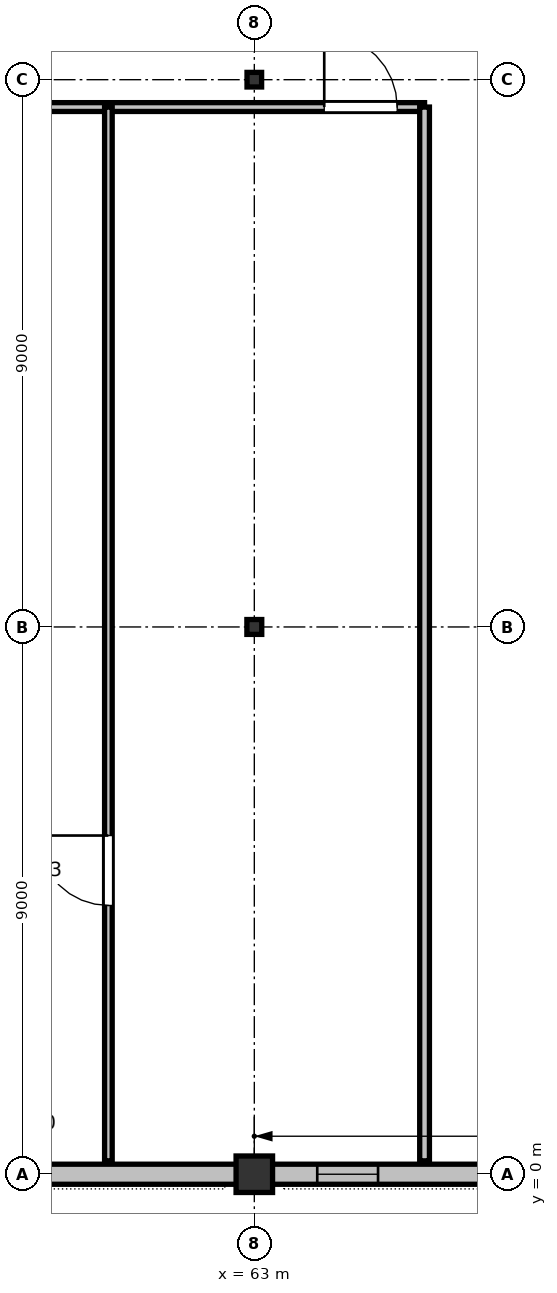
"""IFC4 building model, lengths in metres.
Left out: names, types, materials, properties, quantities, classifications, styles, units other than length and angle.
Written with IfcOpenShell. Run it as: python <this file> out.ifc"""

import sys

from ifc_helpers import new_model, si_unit, direction, frame, frame_2d, origin, origin_2d, place, context, subcontext, project, spatial, rectangle, hollow_circle, i_section, extrude, element, fill, save


model = new_model("IFC4")
c1 = context("Model", 3, precision=1e-05, world=origin(), true_north=direction((0.0, 1.0)))
c2 = subcontext(c1, "Body", "Model", "MODEL_VIEW")
j1 = project(units=[si_unit("LENGTHUNIT", "METRE"), si_unit("PLANEANGLEUNIT", "RADIAN")], contexts=[c1])
p1 = place(None, origin())
s1 = spatial("IfcSite", under=j1, at=p1, CompositionType="ELEMENT")
p2 = place(p1, origin())
s2 = spatial("IfcBuilding", under=s1, at=p2, CompositionType="ELEMENT")
p3 = place(p2, frame((0.0, 0.0, 36.0)))
s3 = spatial("IfcBuildingStorey", under=s2, at=p3, CompositionType="ELEMENT", Elevation=36.0)
p4 = place(p3, frame((63.0, 0.0, 0.0), z_axis=(0.0, 0.0, 1.0), x_axis=(1.0, 0.0, 0.0)))
e1 = element("IfcColumn", 1, at=p4, inside=s3, PredefinedType="COLUMN", context=c2, shape_type="SweptSolid", body=[
    extrude(rectangle(XDim=0.6, YDim=0.6, at=origin_2d()), origin(), (0.0, 0.0, 1.0), 4.2),
])
p5 = place(p3, frame((63.0, 9.0, 0.0), z_axis=(0.0, 0.0, 1.0), x_axis=(1.0, 0.0, 0.0)))
e2 = element("IfcColumn", 2, at=p5, inside=s3, PredefinedType="COLUMN", context=c2, shape_type="SweptSolid", body=[
    extrude(hollow_circle(Radius=0.122, WallThickness=0.012, at=origin_2d()), origin(), (0.0, 0.0, 1.0), 4.2),
])
p6 = place(p3, frame((63.0, 18.0, 0.0), z_axis=(0.0, 0.0, 1.0), x_axis=(1.0, 0.0, 0.0)))
e3 = element("IfcColumn", 3, at=p6, inside=s3, PredefinedType="COLUMN", context=c2, shape_type="SweptSolid", body=[
    extrude(i_section(OverallWidth=0.24, OverallDepth=0.24, WebThickness=0.01, FlangeThickness=0.017, at=origin_2d()), origin(), (0.0, 0.0, 1.0), 4.2),
])
p7 = place(p3, frame((54.285, 0.0, 0.0), z_axis=(0.0, 0.0, 1.0), x_axis=(1.0, 0.0, 0.0)))
e4 = element("IfcWall", 4, at=p7, inside=s3, PredefinedType="STANDARD", context=c2, shape_type="SweptSolid", body=[
    extrude(rectangle(XDim=8.43, YDim=0.33, at=frame_2d((4.215, 0.0))), origin(), (0.0, 0.0, 1.0), 3.755),
])
p8 = place(p7, frame((3.615, 0.0, 0.9)))
e5 = element("IfcOpeningElement", 5, at=p8, cuts=e4, PredefinedType="OPENING", context=c2, shape_type="SweptSolid", body=[
    extrude(rectangle(XDim=1.2, YDim=1.4, at=frame_2d((0.6, 0.7))), frame((0.0, 0.175, 0.0), z_axis=(0.0, -1.0, 0.0), x_axis=(1.0, 0.0, 0.0)), (0.0, 0.0, 1.0), 0.35),
])
p9 = place(p3, frame((63.285, 0.0, 0.0), z_axis=(0.0, 0.0, 1.0), x_axis=(1.0, 0.0, 0.0)))
e6 = element("IfcWall", 6, at=p9, inside=s3, PredefinedType="STANDARD", context=c2, shape_type="SweptSolid", body=[
    extrude(rectangle(XDim=8.43, YDim=0.33, at=frame_2d((4.215, 0.0))), origin(), (0.0, 0.0, 1.0), 3.755),
])
p10 = place(p9, frame((0.75, 0.0, 0.9)))
e7 = element("IfcOpeningElement", 7, at=p10, cuts=e6, PredefinedType="OPENING", context=c2, shape_type="SweptSolid", body=[
    extrude(rectangle(XDim=1.0, YDim=1.35, at=frame_2d((0.5, 0.675))), frame((0.0, 0.175, 0.0), z_axis=(0.0, -1.0, 0.0), x_axis=(1.0, 0.0, 0.0)), (0.0, 0.0, 1.0), 0.35),
])
p11 = place(p3, frame((42.2, 17.55, 0.0), z_axis=(0.0, 0.0, 1.0), x_axis=(1.0, 0.0, 0.0)))
e8 = element("IfcWall", 8, at=p11, inside=s3, PredefinedType="PARTITIONING", context=c2, shape_type="SweptSolid", body=[
    extrude(rectangle(XDim=23.6, YDim=0.145, at=frame_2d((11.8, 0.0))), origin(), (0.0, 0.0, 1.0), 3.96),
])
p12 = place(p11, frame((0.45, 0.0, 0.0)))
e9 = element("IfcOpeningElement", 9, at=p12, cuts=e8, PredefinedType="OPENING", context=c2, shape_type="SweptSolid", body=[
    extrude(rectangle(XDim=1.0, YDim=2.14, at=frame_2d((0.5, 1.07))), frame((0.0, 0.083, 0.0), z_axis=(0.0, -1.0, 0.0), x_axis=(1.0, 0.0, 0.0)), (0.0, 0.0, 1.0), 0.165),
])
p13 = place(p11, frame((6.769, 0.0, 0.0)))
e10 = element("IfcOpeningElement", 10, at=p13, cuts=e8, PredefinedType="OPENING", context=c2, shape_type="SweptSolid", body=[
    extrude(rectangle(XDim=0.95, YDim=2.12, at=frame_2d((0.475, 1.06))), frame((0.0, 0.083, 0.0), z_axis=(0.0, -1.0, 0.0), x_axis=(1.0, 0.0, 0.0)), (0.0, 0.0, 1.0), 0.165),
])
p14 = place(p11, frame((15.717, 0.0, 0.0)))
e11 = element("IfcOpeningElement", 11, at=p14, cuts=e8, PredefinedType="OPENING", context=c2, shape_type="SweptSolid", body=[
    extrude(rectangle(XDim=0.9, YDim=2.1, at=frame_2d((0.45, 1.05))), frame((0.0, 0.083, 0.0), z_axis=(0.0, -1.0, 0.0), x_axis=(1.0, 0.0, 0.0)), (0.0, 0.0, 1.0), 0.165),
])
p15 = place(p11, frame((21.95, 0.0, 0.0)))
e12 = element("IfcOpeningElement", 12, at=p15, cuts=e8, PredefinedType="OPENING", context=c2, shape_type="SweptSolid", body=[
    extrude(rectangle(XDim=1.2, YDim=2.18, at=frame_2d((0.6, 1.09))), frame((0.0, 0.083, 0.0), z_axis=(0.0, -1.0, 0.0), x_axis=(1.0, 0.0, 0.0)), (0.0, 0.0, 1.0), 0.165),
])
p16 = place(p3, frame((65.8, 0.22, 0.0), z_axis=(0.0, 0.0, 1.0), x_axis=(0.0, 1.0, 0.0)))
e13 = element("IfcWall", 13, at=p16, inside=s3, PredefinedType="PARTITIONING", context=c2, shape_type="SweptSolid", body=[
    extrude(rectangle(XDim=17.33, YDim=0.16, at=frame_2d((8.665, 0.0))), origin(), (0.0, 0.0, 1.0), 3.96),
])
p17 = place(p3, frame((60.6, 0.22, 0.0), z_axis=(0.0, 0.0, 1.0), x_axis=(0.0, 1.0, 0.0)))
e14 = element("IfcWall", 14, at=p17, inside=s3, PredefinedType="PARTITIONING", context=c2, shape_type="SweptSolid", body=[
    extrude(rectangle(XDim=17.33, YDim=0.125, at=frame_2d((8.665, 0.0))), origin(), (0.0, 0.0, 1.0), 3.96),
])
p18 = place(p17, frame((4.2, 0.0, 0.0)))
e15 = element("IfcOpeningElement", 15, at=p18, cuts=e14, PredefinedType="OPENING", context=c2, shape_type="SweptSolid", body=[
    extrude(rectangle(XDim=1.15, YDim=2.15, at=frame_2d((0.575, 1.075))), frame((0.0, 0.073, 0.0), z_axis=(0.0, -1.0, 0.0), x_axis=(1.0, 0.0, 0.0)), (0.0, 0.0, 1.0), 0.145),
])
p19 = place(p10, origin())
e16 = element("IfcWindow", 16, at=p19, inside=s3, PartitioningType="SINGLE_PANEL", PredefinedType="WINDOW", context=c2, shape_type="SweptSolid", body=[
    extrude(rectangle(XDim=1.0, YDim=1.35, at=frame_2d((0.5, 0.675))), frame((0.0, 0.03, 0.0), z_axis=(0.0, -1.0, 0.0), x_axis=(1.0, 0.0, 0.0)), (0.0, 0.0, 1.0), 0.06),
])
fill(e7, e16)
p20 = place(p18, origin())
e17 = element("IfcDoor", 17, at=p20, inside=s3, OperationType="SINGLE_SWING_RIGHT", PredefinedType="DOOR", context=c2, shape_type="SweptSolid", body=[
    extrude(rectangle(XDim=1.15, YDim=2.15, at=frame_2d((0.575, 1.075))), frame((0.0, 0.025, 0.0), z_axis=(0.0, -1.0, 0.0), x_axis=(1.0, 0.0, 0.0)), (0.0, 0.0, 1.0), 0.05),
])
fill(e15, e17)
p21 = place(p15, origin())
e18 = element("IfcDoor", 18, at=p21, inside=s3, OperationType="SINGLE_SWING_LEFT", PredefinedType="DOOR", context=c2, shape_type="SweptSolid", body=[
    extrude(rectangle(XDim=1.2, YDim=2.18, at=frame_2d((0.6, 1.09))), frame((0.0, 0.025, 0.0), z_axis=(0.0, -1.0, 0.0), x_axis=(1.0, 0.0, 0.0)), (0.0, 0.0, 1.0), 0.05),
])
fill(e12, e18)
save(model, sys.argv[1])
